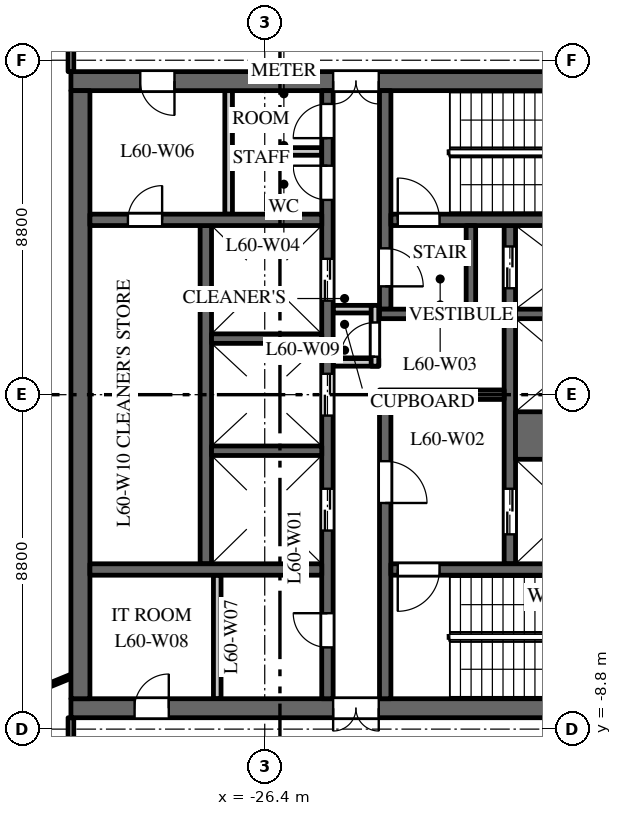
"""IFC4 building model, lengths in metres.
Left out: names, types, materials, properties, quantities, classifications, styles, units other than length and angle.
Written with IfcOpenShell. Run it as: python <this file> out.ifc"""

import sys

from ifc_helpers import new_model, si_unit, direction, frame, frame_2d, origin, place, context, subcontext, project, spatial, rectangle, extrude, element, fill, save


model = new_model("IFC4")
c1 = context("Model", 3, precision=1e-05, world=origin(), true_north=direction((0.0, 1.0)))
c2 = subcontext(c1, "Body", "Model", "MODEL_VIEW")
j1 = project(units=[si_unit("LENGTHUNIT", "METRE"), si_unit("PLANEANGLEUNIT", "RADIAN")], contexts=[c1])
p1 = place(None, origin())
s1 = spatial("IfcSite", under=j1, at=p1, CompositionType="ELEMENT")
p2 = place(p1, origin())
s2 = spatial("IfcBuilding", under=s1, at=p2, CompositionType="ELEMENT")
p3 = place(p2, frame((0.0, 0.0, 281.5)))
s3 = spatial("IfcBuildingStorey", under=s2, at=p3, CompositionType="ELEMENT", Elevation=281.5)
p4 = place(p3, frame((-16.5, 8.25, 0.0), z_axis=(0.0, 0.0, 1.0), x_axis=(-1.0, 0.0, 0.0)))
e1 = element("IfcWall", 1, at=p4, inside=s3, PredefinedType="SHEAR", context=c2, shape_type="SweptSolid", body=[
    extrude(rectangle(XDim=15.0, YDim=0.5, at=frame_2d((7.5, 0.0))), origin(), (0.0, 0.0, 1.0), 3.7),
])
p5 = place(p4, frame((6.9, 0.0, 0.0)))
e2 = element("IfcOpeningElement", 2, at=p5, cuts=e1, PredefinedType="OPENING", context=c2, shape_type="SweptSolid", body=[
    extrude(rectangle(XDim=1.2, YDim=2.1, at=frame_2d((0.6, 1.05))), frame((0.0, 0.26, 0.0), z_axis=(0.0, -1.0, 0.0), x_axis=(1.0, 0.0, 0.0)), (0.0, 0.0, 1.0), 0.52),
])
p6 = place(p4, frame((12.275, 0.0, 0.0)))
e3 = element("IfcOpeningElement", 3, at=p6, cuts=e1, PredefinedType="OPENING", context=c2, shape_type="SweptSolid", body=[
    extrude(rectangle(XDim=0.9, YDim=2.1, at=frame_2d((0.45, 1.05))), frame((0.0, 0.26, 0.0), z_axis=(0.0, -1.0, 0.0), x_axis=(1.0, 0.0, 0.0)), (0.0, 0.0, 1.0), 0.52),
])
p7 = place(p3, frame((-16.5, -8.25, 0.0), z_axis=(0.0, 0.0, 1.0), x_axis=(-1.0, 0.0, 0.0)))
e4 = element("IfcWall", 4, at=p7, inside=s3, PredefinedType="SHEAR", context=c2, shape_type="SweptSolid", body=[
    extrude(rectangle(XDim=15.0, YDim=0.5, at=frame_2d((7.5, 0.0))), origin(), (0.0, 0.0, 1.0), 3.7),
])
p8 = place(p7, frame((6.9, 0.0, 0.0)))
e5 = element("IfcOpeningElement", 5, at=p8, cuts=e4, PredefinedType="OPENING", context=c2, shape_type="SweptSolid", body=[
    extrude(rectangle(XDim=1.2, YDim=2.1, at=frame_2d((0.6, 1.05))), frame((0.0, 0.26, 0.0), z_axis=(0.0, -1.0, 0.0), x_axis=(1.0, 0.0, 0.0)), (0.0, 0.0, 1.0), 0.52),
])
p9 = place(p7, frame((12.425, 0.0, 0.0)))
e6 = element("IfcOpeningElement", 6, at=p9, cuts=e4, PredefinedType="OPENING", context=c2, shape_type="SweptSolid", body=[
    extrude(rectangle(XDim=0.9, YDim=2.1, at=frame_2d((0.45, 1.05))), frame((0.0, 0.26, 0.0), z_axis=(0.0, -1.0, 0.0), x_axis=(1.0, 0.0, 0.0)), (0.0, 0.0, 1.0), 0.52),
])
p10 = place(p3, frame((-27.95, -4.45, 0.0), z_axis=(0.0, 0.0, 1.0), x_axis=(0.0, 1.0, 0.0)))
e7 = element("IfcWall", 7, at=p10, inside=s3, PredefinedType="SHEAR", context=c2, shape_type="SweptSolid", body=[
    extrude(rectangle(XDim=8.9, YDim=0.3, at=frame_2d((4.45, 0.0))), origin(), (0.0, 0.0, 1.0), 3.7),
])
p11 = place(p3, frame((-19.95, -4.45, 0.0), z_axis=(0.0, 0.0, 1.0), x_axis=(0.0, 1.0, 0.0)))
e8 = element("IfcWall", 8, at=p11, inside=s3, PredefinedType="SHEAR", context=c2, shape_type="SweptSolid", body=[
    extrude(rectangle(XDim=8.9, YDim=0.3, at=frame_2d((4.45, 0.0))), origin(), (0.0, 0.0, 1.0), 3.7),
])
p12 = place(p11, frame((0.775, 0.0, 0.0)))
e9 = element("IfcOpeningElement", 9, at=p12, cuts=e8, PredefinedType="OPENING", context=c2, shape_type="SweptSolid", body=[
    extrude(rectangle(XDim=1.2, YDim=2.1, at=frame_2d((0.6, 1.05))), frame((0.0, 0.16, 0.0), z_axis=(0.0, -1.0, 0.0), x_axis=(1.0, 0.0, 0.0)), (0.0, 0.0, 1.0), 0.32),
])
p13 = place(p11, frame((7.25, 0.0, 0.0)))
e10 = element("IfcOpeningElement", 10, at=p13, cuts=e8, PredefinedType="OPENING", context=c2, shape_type="SweptSolid", body=[
    extrude(rectangle(XDim=1.1, YDim=2.1, at=frame_2d((0.55, 1.05))), frame((0.0, 0.16, 0.0), z_axis=(0.0, -1.0, 0.0), x_axis=(1.0, 0.0, 0.0)), (0.0, 0.0, 1.0), 0.32),
])
p14 = place(p3, frame((-24.75, -8.0, 0.0), z_axis=(0.0, 0.0, 1.0), x_axis=(0.0, 1.0, 0.0)))
e11 = element("IfcWall", 11, at=p14, inside=s3, PredefinedType="SHEAR", context=c2, shape_type="SweptSolid", body=[
    extrude(rectangle(XDim=16.0, YDim=0.3, at=frame_2d((8.0, 0.0))), origin(), (0.0, 0.0, 1.0), 3.7),
])
p15 = place(p14, frame((4.425, 0.0, 0.0)))
e12 = element("IfcOpeningElement", 12, at=p15, cuts=e11, PredefinedType="OPENING", context=c2, shape_type="SweptSolid", body=[
    extrude(rectangle(XDim=1.1, YDim=2.1, at=frame_2d((0.55, 1.05))), frame((0.0, 0.16, 0.0), z_axis=(0.0, -1.0, 0.0), x_axis=(1.0, 0.0, 0.0)), (0.0, 0.0, 1.0), 0.32),
])
p16 = place(p14, frame((7.45, 0.0, 0.0)))
e13 = element("IfcOpeningElement", 13, at=p16, cuts=e11, PredefinedType="OPENING", context=c2, shape_type="SweptSolid", body=[
    extrude(rectangle(XDim=1.1, YDim=2.1, at=frame_2d((0.55, 1.05))), frame((0.0, 0.16, 0.0), z_axis=(0.0, -1.0, 0.0), x_axis=(1.0, 0.0, 0.0)), (0.0, 0.0, 1.0), 0.32),
])
p17 = place(p14, frame((10.475, 0.0, 0.0)))
e14 = element("IfcOpeningElement", 14, at=p17, cuts=e11, PredefinedType="OPENING", context=c2, shape_type="SweptSolid", body=[
    extrude(rectangle(XDim=1.1, YDim=2.1, at=frame_2d((0.55, 1.05))), frame((0.0, 0.16, 0.0), z_axis=(0.0, -1.0, 0.0), x_axis=(1.0, 0.0, 0.0)), (0.0, 0.0, 1.0), 0.32),
])
p18 = place(p14, frame((13.125, 0.0, 0.0)))
e15 = element("IfcOpeningElement", 15, at=p18, cuts=e11, PredefinedType="OPENING", context=c2, shape_type="SweptSolid", body=[
    extrude(rectangle(XDim=0.9, YDim=2.1, at=frame_2d((0.45, 1.05))), frame((0.0, 0.16, 0.0), z_axis=(0.0, -1.0, 0.0), x_axis=(1.0, 0.0, 0.0)), (0.0, 0.0, 1.0), 0.32),
])
p19 = place(p14, frame((14.75, 0.0, 0.0)))
e16 = element("IfcOpeningElement", 16, at=p19, cuts=e11, PredefinedType="OPENING", context=c2, shape_type="SweptSolid", body=[
    extrude(rectangle(XDim=0.9, YDim=2.1, at=frame_2d((0.45, 1.05))), frame((0.0, 0.16, 0.0), z_axis=(0.0, -1.0, 0.0), x_axis=(1.0, 0.0, 0.0)), (0.0, 0.0, 1.0), 0.32),
])
p20 = place(p14, frame((1.35, 0.0, 0.0)))
e17 = element("IfcOpeningElement", 17, at=p20, cuts=e11, PredefinedType="OPENING", context=c2, shape_type="SweptSolid", body=[
    extrude(rectangle(XDim=0.9, YDim=2.1, at=frame_2d((0.45, 1.05))), frame((0.0, 0.16, 0.0), z_axis=(0.0, -1.0, 0.0), x_axis=(1.0, 0.0, 0.0)), (0.0, 0.0, 1.0), 0.32),
])
p21 = place(p3, frame((-20.1, 0.0, 0.0), z_axis=(0.0, 0.0, 1.0), x_axis=(-1.0, 0.0, 0.0)))
e18 = element("IfcWall", 18, at=p21, inside=s3, PredefinedType="SHEAR", context=c2, shape_type="SweptSolid", body=[
    extrude(rectangle(XDim=3.28, YDim=0.25, at=frame_2d((1.64, 0.0))), origin(), (0.0, 0.0, 1.0), 3.7),
])
for number, where, z_axis, x_axis in (
    (19, (-23.4, 0.85, 0.0), (0.0, 0.0, 1.0), (-1.0, 0.0, 0.0)),
    (20, (-23.4, 2.25, 0.0), (0.0, 0.0, 1.0), (-1.0, 0.0, 0.0)),
):
    element("IfcWall", number, at=place(p3, frame(where, z_axis=z_axis, x_axis=x_axis)), inside=s3, PredefinedType="PARTITIONING", context=c2, shape_type="SweptSolid", body=[
        extrude(rectangle(XDim=1.2, YDim=0.2, at=frame_2d((0.6, 0.0))), origin(), (0.0, 0.0, 1.0), 3.7),
    ])
p22 = place(p3, frame((-23.5, 0.75, 0.0), z_axis=(0.0, 0.0, 1.0), x_axis=(0.0, 1.0, 0.0)))
e21 = element("IfcWall", 21, at=p22, inside=s3, PredefinedType="PARTITIONING", context=c2, shape_type="SweptSolid", body=[
    extrude(rectangle(XDim=1.6, YDim=0.2, at=frame_2d((0.8, 0.0))), origin(), (0.0, 0.0, 1.0), 3.7),
])
p23 = place(p22, frame((0.25, 0.0, 0.0)))
e22 = element("IfcOpeningElement", 22, at=p23, cuts=e21, PredefinedType="OPENING", context=c2, shape_type="SweptSolid", body=[
    extrude(rectangle(XDim=0.9, YDim=2.1, at=frame_2d((0.45, 1.05))), frame((0.0, 0.11, 0.0), z_axis=(0.0, -1.0, 0.0), x_axis=(1.0, 0.0, 0.0)), (0.0, 0.0, 1.0), 0.22),
])
p24 = place(p3, frame((-31.25, -8.0, 0.0), z_axis=(0.0, 0.0, 1.0), x_axis=(0.0, 1.0, 0.0)))
e23 = element("IfcWall", 23, at=p24, inside=s3, PredefinedType="SHEAR", context=c2, shape_type="SweptSolid", body=[
    extrude(rectangle(XDim=16.0, YDim=0.5, at=frame_2d((8.0, 0.0))), origin(), (0.0, 0.0, 1.0), 3.7),
])
p25 = place(p3, frame((-24.9, 4.6, 0.0), z_axis=(0.0, 0.0, 1.0), x_axis=(-1.0, 0.0, 0.0)))
e24 = element("IfcWall", 24, at=p25, inside=s3, PredefinedType="SHEAR", context=c2, shape_type="SweptSolid", body=[
    extrude(rectangle(XDim=6.1, YDim=0.3, at=frame_2d((3.05, 0.0))), origin(), (0.0, 0.0, 1.0), 3.7),
])
p26 = place(p25, frame((4.2, 0.0, 0.0)))
e25 = element("IfcOpeningElement", 25, at=p26, cuts=e24, PredefinedType="OPENING", context=c2, shape_type="SweptSolid", body=[
    extrude(rectangle(XDim=0.9, YDim=2.1, at=frame_2d((0.45, 1.05))), frame((0.0, 0.16, 0.0), z_axis=(0.0, -1.0, 0.0), x_axis=(1.0, 0.0, 0.0)), (0.0, 0.0, 1.0), 0.32),
])
for number, where, z_axis, x_axis in (
    (26, (-27.35, 4.75, 0.0), (0.0, 0.0, 1.0), (0.0, 1.0, 0.0)),
    (27, (-27.65, -8.0, 0.0), (0.0, 0.0, 1.0), (0.0, 1.0, 0.0)),
):
    element("IfcWall", number, at=place(p3, frame(where, z_axis=z_axis, x_axis=x_axis)), inside=s3, PredefinedType="PARTITIONING", context=c2, shape_type="SweptSolid", body=[
        extrude(rectangle(XDim=3.25, YDim=0.2, at=frame_2d((1.625, 0.0))), origin(), (0.0, 0.0, 1.0), 3.7),
    ])
p27 = place(p3, frame((-24.9, 6.4, 0.0), z_axis=(0.0, 0.0, 1.0), x_axis=(-1.0, 0.0, 0.0)))
e28 = element("IfcWall", 28, at=p27, inside=s3, PredefinedType="PARTITIONING", context=c2, shape_type="SweptSolid", body=[
    extrude(rectangle(XDim=2.35, YDim=0.2, at=frame_2d((1.175, 0.0))), origin(), (0.0, 0.0, 1.0), 3.7),
])
p28 = place(p3, frame((-24.9, -4.6, 0.0), z_axis=(0.0, 0.0, 1.0), x_axis=(-1.0, 0.0, 0.0)))
e29 = element("IfcWall", 29, at=p28, inside=s3, PredefinedType="SHEAR", context=c2, shape_type="SweptSolid", body=[
    extrude(rectangle(XDim=6.1, YDim=0.3, at=frame_2d((3.05, 0.0))), origin(), (0.0, 0.0, 1.0), 3.7),
])
p29 = place(p3, frame((-16.9, -1.075, 0.0), z_axis=(0.0, 0.0, 1.0), x_axis=(-1.0, 0.0, 0.0)))
e30 = element("IfcWall", 30, at=p29, inside=s3, PredefinedType="SHEAR", context=c2, shape_type="SweptSolid", body=[
    extrude(rectangle(XDim=2.9, YDim=1.25, at=frame_2d((1.45, 0.0))), origin(), (0.0, 0.0, 1.0), 3.7),
])
for number, where, z_axis, x_axis in (
    (31, (-16.9, 2.125, 0.0), (0.0, 0.0, 1.0), (-1.0, 0.0, 0.0)),
    (32, (-24.9, -1.475, 0.0), (0.0, 0.0, 1.0), (-1.0, 0.0, 0.0)),
    (33, (-24.9, 1.475, 0.0), (0.0, 0.0, 1.0), (-1.0, 0.0, 0.0)),
):
    element("IfcWall", number, at=place(p3, frame(where, z_axis=z_axis, x_axis=x_axis)), inside=s3, PredefinedType="SHEAR", context=c2, shape_type="SweptSolid", body=[
        extrude(rectangle(XDim=2.9, YDim=0.25, at=frame_2d((1.45, 0.0))), origin(), (0.0, 0.0, 1.0), 3.7),
    ])
p30 = place(p3, frame((-23.23, 2.25, 0.0), z_axis=(0.0, 0.0, 1.0), x_axis=(0.0, 1.0, 0.0)))
e34 = element("IfcWall", 34, at=p30, inside=s3, PredefinedType="SHEAR", context=c2, shape_type="SweptSolid", body=[
    extrude(rectangle(XDim=5.75, YDim=0.3, at=frame_2d((2.875, 0.0))), origin(), (0.0, 0.0, 1.0), 3.7),
])
p31 = place(p30, frame((0.6, 0.0, 0.0)))
e35 = element("IfcOpeningElement", 35, at=p31, cuts=e34, PredefinedType="OPENING", context=c2, shape_type="SweptSolid", body=[
    extrude(rectangle(XDim=1.0, YDim=2.1, at=frame_2d((0.5, 1.05))), frame((0.0, 0.16, 0.0), z_axis=(0.0, -1.0, 0.0), x_axis=(1.0, 0.0, 0.0)), (0.0, 0.0, 1.0), 0.32),
])
p32 = place(p3, frame((-23.23, -8.0, 0.0), z_axis=(0.0, 0.0, 1.0), x_axis=(0.0, 1.0, 0.0)))
e36 = element("IfcWall", 36, at=p32, inside=s3, PredefinedType="SHEAR", context=c2, shape_type="SweptSolid", body=[
    extrude(rectangle(XDim=7.875, YDim=0.3, at=frame_2d((3.938, 0.0))), origin(), (0.0, 0.0, 1.0), 3.7),
])
p33 = place(p32, frame((5.15, 0.0, 0.0)))
e37 = element("IfcOpeningElement", 37, at=p33, cuts=e36, PredefinedType="OPENING", context=c2, shape_type="SweptSolid", body=[
    extrude(rectangle(XDim=1.1, YDim=2.1, at=frame_2d((0.55, 1.05))), frame((0.0, 0.16, 0.0), z_axis=(0.0, -1.0, 0.0), x_axis=(1.0, 0.0, 0.0)), (0.0, 0.0, 1.0), 0.32),
])
p34 = place(p3, frame((-16.9, 4.6, 0.0), z_axis=(0.0, 0.0, 1.0), x_axis=(-1.0, 0.0, 0.0)))
e38 = element("IfcWall", 38, at=p34, inside=s3, PredefinedType="SHEAR", context=c2, shape_type="SweptSolid", body=[
    extrude(rectangle(XDim=6.18, YDim=0.3, at=frame_2d((3.09, 0.0))), origin(), (0.0, 0.0, 1.0), 3.7),
])
p35 = place(p34, frame((4.9, 0.0, 0.0)))
e39 = element("IfcOpeningElement", 39, at=p35, cuts=e38, PredefinedType="OPENING", context=c2, shape_type="SweptSolid", body=[
    extrude(rectangle(XDim=1.1, YDim=2.1, at=frame_2d((0.55, 1.05))), frame((0.0, 0.16, 0.0), z_axis=(0.0, -1.0, 0.0), x_axis=(1.0, 0.0, 0.0)), (0.0, 0.0, 1.0), 0.32),
])
p36 = place(p3, frame((-16.9, -4.6, 0.0), z_axis=(0.0, 0.0, 1.0), x_axis=(-1.0, 0.0, 0.0)))
e40 = element("IfcWall", 40, at=p36, inside=s3, PredefinedType="SHEAR", context=c2, shape_type="SweptSolid", body=[
    extrude(rectangle(XDim=6.18, YDim=0.3, at=frame_2d((3.09, 0.0))), origin(), (0.0, 0.0, 1.0), 3.7),
])
p37 = place(p36, frame((4.9, 0.0, 0.0)))
e41 = element("IfcOpeningElement", 41, at=p37, cuts=e40, PredefinedType="OPENING", context=c2, shape_type="SweptSolid", body=[
    extrude(rectangle(XDim=1.1, YDim=2.1, at=frame_2d((0.55, 1.05))), frame((0.0, 0.16, 0.0), z_axis=(0.0, -1.0, 0.0), x_axis=(1.0, 0.0, 0.0)), (0.0, 0.0, 1.0), 0.32),
])
p38 = place(p3, frame((-20.85, 2.125, 0.0), z_axis=(0.0, 0.0, 1.0), x_axis=(-1.0, 0.0, 0.0)))
e42 = element("IfcWall", 42, at=p38, inside=s3, PredefinedType="SHEAR", context=c2, shape_type="SweptSolid", body=[
    extrude(rectangle(XDim=2.53, YDim=0.25, at=frame_2d((1.265, 0.0))), origin(), (0.0, 0.0, 1.0), 3.7),
])
p39 = place(p3, frame((-20.975, 2.25, 0.0), z_axis=(0.0, 0.0, 1.0), x_axis=(0.0, 1.0, 0.0)))
e43 = element("IfcWall", 43, at=p39, inside=s3, PredefinedType="SHEAR", context=c2, shape_type="SweptSolid", body=[
    extrude(rectangle(XDim=2.2, YDim=0.25, at=frame_2d((1.1, 0.0))), origin(), (0.0, 0.0, 1.0), 3.7),
])
p40 = place(p3, frame((-34.234, -8.53, 0.0), z_axis=(0.0, 0.0, 1.0), x_axis=(0.925344112436, 0.379128307542, 0.0)))
e44 = element("IfcWall", 44, at=p40, inside=s3, PredefinedType="PARTITIONING", context=c2, shape_type="SweptSolid", body=[
    extrude(rectangle(XDim=2.954, YDim=0.1, at=frame_2d((1.477, 0.0))), origin(), (0.0, 0.0, 1.0), 3.0),
])
p41 = place(p3, frame((-31.5, -10.7, 0.0), z_axis=(0.0, 0.0, 1.0), x_axis=(0.0, 1.0, 0.0)))
e45 = element("IfcWall", 45, at=p41, inside=s3, PredefinedType="PARTITIONING", context=c2, shape_type="SweptSolid", body=[
    extrude(rectangle(XDim=2.2, YDim=0.15, at=frame_2d((1.1, 0.0))), origin(), (0.0, 0.0, 1.0), 3.7),
])
p42 = place(p3, frame((-31.5, 8.5, 0.0), z_axis=(0.0, 0.0, 1.0), x_axis=(0.0, 1.0, 0.0)))
e46 = element("IfcWall", 46, at=p42, inside=s3, PredefinedType="PARTITIONING", context=c2, shape_type="SweptSolid", body=[
    extrude(rectangle(XDim=2.2, YDim=0.15, at=frame_2d((1.1, 0.0))), origin(), (0.0, 0.0, 1.0), 3.7),
])
p43 = place(p42, frame((0.55, 0.0, 0.0)))
e47 = element("IfcOpeningElement", 47, at=p43, cuts=e46, PredefinedType="OPENING", context=c2, shape_type="SweptSolid", body=[
    extrude(rectangle(XDim=1.0, YDim=2.1, at=frame_2d((0.5, 1.05))), frame((0.0, 0.085, 0.0), z_axis=(0.0, -1.0, 0.0), x_axis=(1.0, 0.0, 0.0)), (0.0, 0.0, 1.0), 0.17),
])
p44 = place(p12, origin())
e48 = element("IfcDoor", 48, at=p44, inside=s3, OperationType="DOUBLE_DOOR_SLIDING", PredefinedType="DOOR", context=c2, shape_type="SweptSolid", body=[
    extrude(rectangle(XDim=1.2, YDim=2.1, at=frame_2d((0.6, 1.05))), frame((0.0, 0.025, 0.0), z_axis=(0.0, -1.0, 0.0), x_axis=(1.0, 0.0, 0.0)), (0.0, 0.0, 1.0), 0.05),
])
fill(e9, e48)
p45 = place(p13, origin())
e49 = element("IfcDoor", 49, at=p45, inside=s3, OperationType="DOUBLE_DOOR_SLIDING", PredefinedType="DOOR", context=c2, shape_type="SweptSolid", body=[
    extrude(rectangle(XDim=1.1, YDim=2.1, at=frame_2d((0.55, 1.05))), frame((0.0, 0.025, 0.0), z_axis=(0.0, -1.0, 0.0), x_axis=(1.0, 0.0, 0.0)), (0.0, 0.0, 1.0), 0.05),
])
fill(e10, e49)
p46 = place(p15, origin())
e50 = element("IfcDoor", 50, at=p46, inside=s3, OperationType="DOUBLE_DOOR_SLIDING", PredefinedType="DOOR", context=c2, shape_type="SweptSolid", body=[
    extrude(rectangle(XDim=1.1, YDim=2.1, at=frame_2d((0.55, 1.05))), frame((0.0, 0.025, 0.0), z_axis=(0.0, -1.0, 0.0), x_axis=(1.0, 0.0, 0.0)), (0.0, 0.0, 1.0), 0.05),
])
fill(e12, e50)
p47 = place(p16, origin())
e51 = element("IfcDoor", 51, at=p47, inside=s3, OperationType="DOUBLE_DOOR_SLIDING", PredefinedType="DOOR", context=c2, shape_type="SweptSolid", body=[
    extrude(rectangle(XDim=1.1, YDim=2.1, at=frame_2d((0.55, 1.05))), frame((0.0, 0.025, 0.0), z_axis=(0.0, -1.0, 0.0), x_axis=(1.0, 0.0, 0.0)), (0.0, 0.0, 1.0), 0.05),
])
fill(e13, e51)
p48 = place(p17, origin())
e52 = element("IfcDoor", 52, at=p48, inside=s3, OperationType="DOUBLE_DOOR_SLIDING", PredefinedType="DOOR", context=c2, shape_type="SweptSolid", body=[
    extrude(rectangle(XDim=1.1, YDim=2.1, at=frame_2d((0.55, 1.05))), frame((0.0, 0.025, 0.0), z_axis=(0.0, -1.0, 0.0), x_axis=(1.0, 0.0, 0.0)), (0.0, 0.0, 1.0), 0.05),
])
fill(e14, e52)
p49 = place(p35, origin())
e53 = element("IfcDoor", 53, at=p49, inside=s3, OperationType="SINGLE_SWING_RIGHT", PredefinedType="DOOR", context=c2, shape_type="SweptSolid", body=[
    extrude(rectangle(XDim=1.1, YDim=2.1, at=frame_2d((0.55, 1.05))), frame((0.0, 0.025, 0.0), z_axis=(0.0, -1.0, 0.0), x_axis=(1.0, 0.0, 0.0)), (0.0, 0.0, 1.0), 0.05),
])
fill(e39, e53)
p50 = place(p37, origin())
e54 = element("IfcDoor", 54, at=p50, inside=s3, OperationType="SINGLE_SWING_LEFT", PredefinedType="DOOR", context=c2, shape_type="SweptSolid", body=[
    extrude(rectangle(XDim=1.1, YDim=2.1, at=frame_2d((0.55, 1.05))), frame((0.0, 0.025, 0.0), z_axis=(0.0, -1.0, 0.0), x_axis=(1.0, 0.0, 0.0)), (0.0, 0.0, 1.0), 0.05),
])
fill(e41, e54)
p51 = place(p33, origin())
e55 = element("IfcDoor", 55, at=p51, inside=s3, OperationType="SINGLE_SWING_LEFT", PredefinedType="DOOR", context=c2, shape_type="SweptSolid", body=[
    extrude(rectangle(XDim=1.1, YDim=2.1, at=frame_2d((0.55, 1.05))), frame((0.0, 0.025, 0.0), z_axis=(0.0, -1.0, 0.0), x_axis=(1.0, 0.0, 0.0)), (0.0, 0.0, 1.0), 0.05),
])
fill(e37, e55)
p52 = place(p31, origin())
e56 = element("IfcDoor", 56, at=p52, inside=s3, OperationType="SINGLE_SWING_LEFT", PredefinedType="DOOR", context=c2, shape_type="SweptSolid", body=[
    extrude(rectangle(XDim=1.0, YDim=2.1, at=frame_2d((0.5, 1.05))), frame((0.0, 0.025, 0.0), z_axis=(0.0, -1.0, 0.0), x_axis=(1.0, 0.0, 0.0)), (0.0, 0.0, 1.0), 0.05),
])
fill(e35, e56)
p53 = place(p5, origin())
e57 = element("IfcDoor", 57, at=p53, inside=s3, OperationType="DOUBLE_DOOR_DOUBLE_SWING", PredefinedType="DOOR", context=c2, shape_type="SweptSolid", body=[
    extrude(rectangle(XDim=1.2, YDim=2.1, at=frame_2d((0.6, 1.05))), frame((0.0, 0.025, 0.0), z_axis=(0.0, -1.0, 0.0), x_axis=(1.0, 0.0, 0.0)), (0.0, 0.0, 1.0), 0.05),
])
fill(e2, e57)
p54 = place(p8, origin())
e58 = element("IfcDoor", 58, at=p54, inside=s3, OperationType="DOUBLE_DOOR_DOUBLE_SWING", PredefinedType="DOOR", context=c2, shape_type="SweptSolid", body=[
    extrude(rectangle(XDim=1.2, YDim=2.1, at=frame_2d((0.6, 1.05))), frame((0.0, 0.025, 0.0), z_axis=(0.0, -1.0, 0.0), x_axis=(1.0, 0.0, 0.0)), (0.0, 0.0, 1.0), 0.05),
])
fill(e5, e58)
p55 = place(p18, origin())
e59 = element("IfcDoor", 59, at=p55, inside=s3, OperationType="SINGLE_SWING_LEFT", PredefinedType="DOOR", context=c2, shape_type="SweptSolid", body=[
    extrude(rectangle(XDim=0.9, YDim=2.1, at=frame_2d((0.45, 1.05))), frame((0.0, 0.025, 0.0), z_axis=(0.0, -1.0, 0.0), x_axis=(1.0, 0.0, 0.0)), (0.0, 0.0, 1.0), 0.05),
])
fill(e15, e59)
p56 = place(p19, origin())
e60 = element("IfcDoor", 60, at=p56, inside=s3, OperationType="SINGLE_SWING_RIGHT", PredefinedType="DOOR", context=c2, shape_type="SweptSolid", body=[
    extrude(rectangle(XDim=0.9, YDim=2.1, at=frame_2d((0.45, 1.05))), frame((0.0, 0.025, 0.0), z_axis=(0.0, -1.0, 0.0), x_axis=(1.0, 0.0, 0.0)), (0.0, 0.0, 1.0), 0.05),
])
fill(e16, e60)
p57 = place(p6, origin())
e61 = element("IfcDoor", 61, at=p57, inside=s3, OperationType="SINGLE_SWING_RIGHT", PredefinedType="DOOR", context=c2, shape_type="SweptSolid", body=[
    extrude(rectangle(XDim=0.9, YDim=2.1, at=frame_2d((0.45, 1.05))), frame((0.0, 0.025, 0.0), z_axis=(0.0, -1.0, 0.0), x_axis=(1.0, 0.0, 0.0)), (0.0, 0.0, 1.0), 0.05),
])
fill(e3, e61)
p58 = place(p20, origin())
e62 = element("IfcDoor", 62, at=p58, inside=s3, OperationType="SINGLE_SWING_LEFT", PredefinedType="DOOR", context=c2, shape_type="SweptSolid", body=[
    extrude(rectangle(XDim=0.9, YDim=2.1, at=frame_2d((0.45, 1.05))), frame((0.0, 0.025, 0.0), z_axis=(0.0, -1.0, 0.0), x_axis=(1.0, 0.0, 0.0)), (0.0, 0.0, 1.0), 0.05),
])
fill(e17, e62)
p59 = place(p9, origin())
e63 = element("IfcDoor", 63, at=p59, inside=s3, OperationType="SINGLE_SWING_LEFT", PredefinedType="DOOR", context=c2, shape_type="SweptSolid", body=[
    extrude(rectangle(XDim=0.9, YDim=2.1, at=frame_2d((0.45, 1.05))), frame((0.0, 0.025, 0.0), z_axis=(0.0, -1.0, 0.0), x_axis=(1.0, 0.0, 0.0)), (0.0, 0.0, 1.0), 0.05),
])
fill(e6, e63)
p60 = place(p23, origin())
e64 = element("IfcDoor", 64, at=p60, inside=s3, OperationType="SINGLE_SWING_RIGHT", PredefinedType="DOOR", context=c2, shape_type="SweptSolid", body=[
    extrude(rectangle(XDim=0.9, YDim=2.1, at=frame_2d((0.45, 1.05))), frame((0.0, 0.025, 0.0), z_axis=(0.0, -1.0, 0.0), x_axis=(1.0, 0.0, 0.0)), (0.0, 0.0, 1.0), 0.05),
])
fill(e22, e64)
p61 = place(p26, origin())
e65 = element("IfcDoor", 65, at=p61, inside=s3, OperationType="SINGLE_SWING_LEFT", PredefinedType="DOOR", context=c2, shape_type="SweptSolid", body=[
    extrude(rectangle(XDim=0.9, YDim=2.1, at=frame_2d((0.45, 1.05))), frame((0.0, 0.025, 0.0), z_axis=(0.0, -1.0, 0.0), x_axis=(1.0, 0.0, 0.0)), (0.0, 0.0, 1.0), 0.05),
])
fill(e25, e65)
save(model, sys.argv[1])
